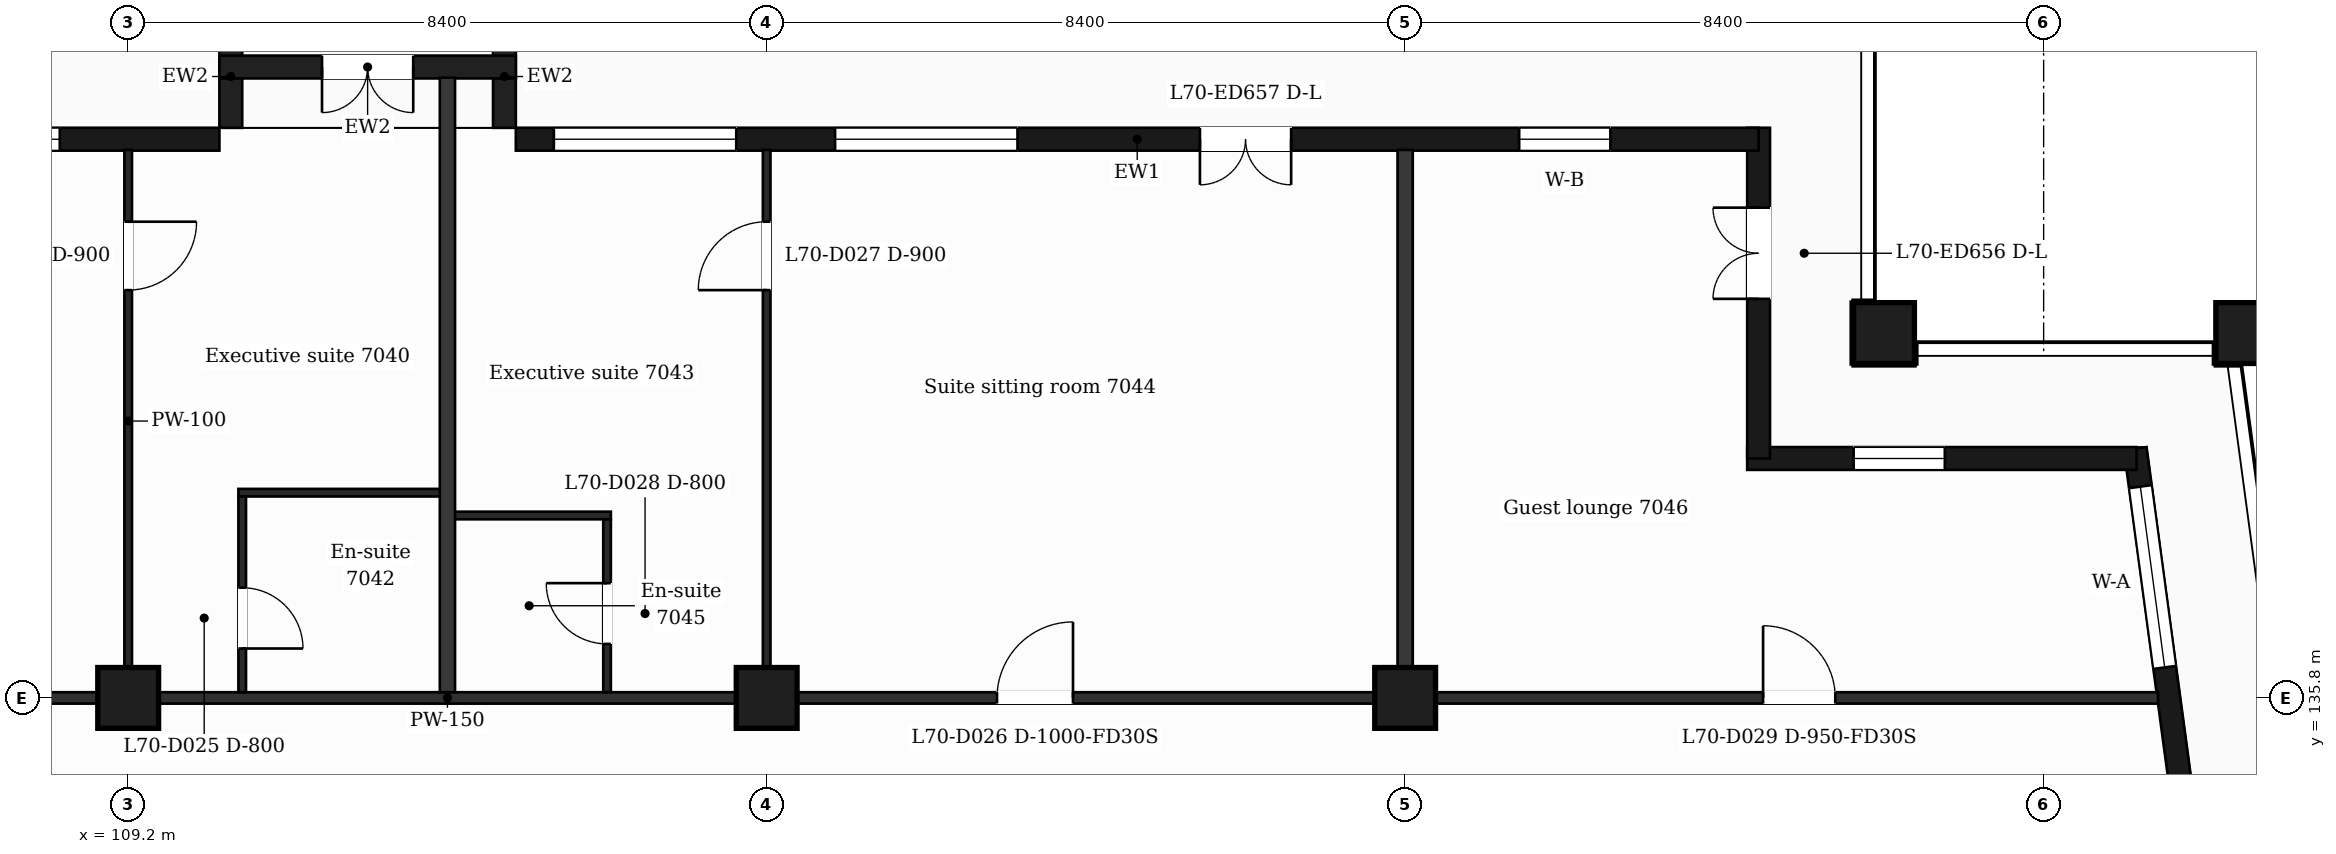
"""IFC4 building model, lengths in metres.
Left out: names, types, materials, properties, quantities, classifications, styles, units other than length and angle.
Written with IfcOpenShell. Run it as: python <this file> out.ifc"""

import sys

from ifc_helpers import new_model, si_unit, direction, frame, frame_2d, origin, origin_2d, place, context, subcontext, project, spatial, rectangle, extrude, element, fill, save


model = new_model("IFC4")
c1 = context("Model", 3, precision=1e-05, world=origin(), true_north=direction((0.0, 1.0)))
c2 = subcontext(c1, "Body", "Model", "MODEL_VIEW")
j1 = project(units=[si_unit("LENGTHUNIT", "METRE"), si_unit("PLANEANGLEUNIT", "RADIAN")], contexts=[c1])
p1 = place(None, origin())
s1 = spatial("IfcSite", under=j1, at=p1, CompositionType="ELEMENT")
p2 = place(p1, origin())
s2 = spatial("IfcBuilding", under=s1, at=p2, CompositionType="ELEMENT")
p3 = place(p2, frame((0.0, 0.0, 288.6)))
s3 = spatial("IfcBuildingStorey", under=s2, at=p3, CompositionType="ELEMENT", Elevation=288.6)
for number, where, z_axis, x_axis in (
    (1, (132.3, 140.6, 0.0), (0.0, 0.0, 1.0), (1.0, 0.0, 0.0)),
    (2, (137.065, 140.6, 0.0), (0.0, 0.0, 1.0), (1.0, 0.0, 0.0)),
    (3, (109.2, 135.8, 0.0), (0.0, 0.0, 1.0), (1.0, 0.0, 0.0)),
    (4, (117.6, 135.8, 0.0), (0.0, 0.0, 1.0), (1.0, 0.0, 0.0)),
    (5, (126.0, 135.8, 0.0), (0.0, 0.0, 1.0), (1.0, 0.0, 0.0)),
):
    element("IfcColumn", number, at=place(p3, frame(where, z_axis=z_axis, x_axis=x_axis)), inside=s3, PredefinedType="COLUMN", context=c2, shape_type="SweptSolid", body=[
        extrude(rectangle(XDim=0.8, YDim=0.8, at=origin_2d()), origin(), (0.0, 0.0, 1.0), 3.7),
    ])
p4 = place(p3, frame((136.504, 132.4, 0.0), z_axis=(0.0, 0.0, 1.0), x_axis=(-0.133399697462, 0.99106231929, 0.0)))
e6 = element("IfcWall", 6, at=p4, inside=s3, PredefinedType="SOLIDWALL", context=c2, shape_type="SweptSolid", body=[
    extrude(rectangle(XDim=6.74, YDim=0.3, at=frame_2d((3.37, 0.0))), origin(), (0.0, 0.0, 1.0), 3.38),
])
p5 = place(p4, frame((1.115, 0.0, 0.0)))
e7 = element("IfcOpeningElement", 7, at=p5, cuts=e6, PredefinedType="OPENING", context=c2, shape_type="SweptSolid", body=[
    extrude(rectangle(XDim=1.2, YDim=2.4, at=frame_2d((0.6, 1.2))), frame((0.0, 0.16, 0.0), z_axis=(0.0, -1.0, 0.0), x_axis=(1.0, 0.0, 0.0)), (0.0, 0.0, 1.0), 0.32),
])
p6 = place(p4, frame((3.835, 0.0, 0.9)))
e8 = element("IfcOpeningElement", 8, at=p6, cuts=e6, PredefinedType="OPENING", context=c2, shape_type="SweptSolid", body=[
    extrude(rectangle(XDim=2.4, YDim=2.1, at=frame_2d((1.2, 1.05))), frame((0.0, 0.16, 0.0), z_axis=(0.0, -1.0, 0.0), x_axis=(1.0, 0.0, 0.0)), (0.0, 0.0, 1.0), 0.32),
])
p7 = place(p3, frame((135.623, 138.95, 0.0), z_axis=(0.0, 0.0, 1.0), x_axis=(-1.0, 0.0, 0.0)))
e9 = element("IfcWall", 9, at=p7, inside=s3, PredefinedType="SOLIDWALL", context=c2, shape_type="SweptSolid", body=[
    extrude(rectangle(XDim=5.123, YDim=0.3, at=frame_2d((2.561, 0.0))), origin(), (0.0, 0.0, 1.0), 3.38),
])
p8 = place(p7, frame((2.523, 0.0, 0.9)))
e10 = element("IfcOpeningElement", 10, at=p8, cuts=e9, PredefinedType="OPENING", context=c2, shape_type="SweptSolid", body=[
    extrude(rectangle(XDim=1.2, YDim=2.1, at=frame_2d((0.6, 1.05))), frame((0.0, 0.16, 0.0), z_axis=(0.0, -1.0, 0.0), x_axis=(1.0, 0.0, 0.0)), (0.0, 0.0, 1.0), 0.32),
])
p9 = place(p3, frame((130.65, 138.95, 0.0), z_axis=(0.0, 0.0, 1.0), x_axis=(0.0, 1.0, 0.0)))
e11 = element("IfcWall", 11, at=p9, inside=s3, PredefinedType="SOLIDWALL", context=c2, shape_type="SweptSolid", body=[
    extrude(rectangle(XDim=4.35, YDim=0.3, at=frame_2d((2.175, 0.0))), origin(), (0.0, 0.0, 1.0), 3.38),
])
p10 = place(p9, frame((2.1, 0.0, 0.0)))
e12 = element("IfcOpeningElement", 12, at=p10, cuts=e11, PredefinedType="OPENING", context=c2, shape_type="SweptSolid", body=[
    extrude(rectangle(XDim=1.2, YDim=2.4, at=frame_2d((0.6, 1.2))), frame((0.0, 0.16, 0.0), z_axis=(0.0, -1.0, 0.0), x_axis=(1.0, 0.0, 0.0)), (0.0, 0.0, 1.0), 0.32),
])
p11 = place(p3, frame((130.65, 143.15, 0.0), z_axis=(0.0, 0.0, 1.0), x_axis=(-1.0, 0.0, 0.0)))
e13 = element("IfcWall", 13, at=p11, inside=s3, PredefinedType="SOLIDWALL", context=c2, shape_type="SweptSolid", body=[
    extrude(rectangle(XDim=16.35, YDim=0.3, at=frame_2d((8.175, 0.0))), origin(), (0.0, 0.0, 1.0), 3.38),
])
p12 = place(p11, frame((1.95, 0.0, 0.9)))
e14 = element("IfcOpeningElement", 14, at=p12, cuts=e13, PredefinedType="OPENING", context=c2, shape_type="SweptSolid", body=[
    extrude(rectangle(XDim=1.2, YDim=2.1, at=frame_2d((0.6, 1.05))), frame((0.0, 0.16, 0.0), z_axis=(0.0, -1.0, 0.0), x_axis=(1.0, 0.0, 0.0)), (0.0, 0.0, 1.0), 0.32),
])
p13 = place(p11, frame((6.15, 0.0, 0.0)))
e15 = element("IfcOpeningElement", 15, at=p13, cuts=e13, PredefinedType="OPENING", context=c2, shape_type="SweptSolid", body=[
    extrude(rectangle(XDim=1.2, YDim=2.4, at=frame_2d((0.6, 1.2))), frame((0.0, 0.16, 0.0), z_axis=(0.0, -1.0, 0.0), x_axis=(1.0, 0.0, 0.0)), (0.0, 0.0, 1.0), 0.32),
])
p14 = place(p11, frame((9.75, 0.0, 0.9)))
e16 = element("IfcOpeningElement", 16, at=p14, cuts=e13, PredefinedType="OPENING", context=c2, shape_type="SweptSolid", body=[
    extrude(rectangle(XDim=2.4, YDim=2.1, at=frame_2d((1.2, 1.05))), frame((0.0, 0.16, 0.0), z_axis=(0.0, -1.0, 0.0), x_axis=(1.0, 0.0, 0.0)), (0.0, 0.0, 1.0), 0.32),
])
p15 = place(p11, frame((13.45, 0.0, 0.9)))
e17 = element("IfcOpeningElement", 17, at=p15, cuts=e13, PredefinedType="OPENING", context=c2, shape_type="SweptSolid", body=[
    extrude(rectangle(XDim=2.4, YDim=2.1, at=frame_2d((1.2, 1.05))), frame((0.0, 0.16, 0.0), z_axis=(0.0, -1.0, 0.0), x_axis=(1.0, 0.0, 0.0)), (0.0, 0.0, 1.0), 0.32),
])
p16 = place(p3, frame((110.4, 143.15, 0.0), z_axis=(0.0, 0.0, 1.0), x_axis=(-1.0, 0.0, 0.0)))
e18 = element("IfcWall", 18, at=p16, inside=s3, PredefinedType="SOLIDWALL", context=c2, shape_type="SweptSolid", body=[
    extrude(rectangle(XDim=14.4, YDim=0.3, at=frame_2d((7.2, 0.0))), origin(), (0.0, 0.0, 1.0), 3.38),
])
p17 = place(p16, frame((2.1, 0.0, 0.9)))
e19 = element("IfcOpeningElement", 19, at=p17, cuts=e18, PredefinedType="OPENING", context=c2, shape_type="SweptSolid", body=[
    extrude(rectangle(XDim=2.4, YDim=2.1, at=frame_2d((1.2, 1.05))), frame((0.0, 0.16, 0.0), z_axis=(0.0, -1.0, 0.0), x_axis=(1.0, 0.0, 0.0)), (0.0, 0.0, 1.0), 0.32),
])
p18 = place(p16, frame((6.9, 0.0, 0.0)))
e20 = element("IfcOpeningElement", 20, at=p18, cuts=e18, PredefinedType="OPENING", context=c2, shape_type="SweptSolid", body=[
    extrude(rectangle(XDim=1.2, YDim=2.4, at=frame_2d((0.6, 1.2))), frame((0.0, 0.16, 0.0), z_axis=(0.0, -1.0, 0.0), x_axis=(1.0, 0.0, 0.0)), (0.0, 0.0, 1.0), 0.32),
])
p19 = place(p16, frame((11.1, 0.0, 0.9)))
e21 = element("IfcOpeningElement", 21, at=p19, cuts=e18, PredefinedType="OPENING", context=c2, shape_type="SweptSolid", body=[
    extrude(rectangle(XDim=1.2, YDim=2.1, at=frame_2d((0.6, 1.05))), frame((0.0, 0.16, 0.0), z_axis=(0.0, -1.0, 0.0), x_axis=(1.0, 0.0, 0.0)), (0.0, 0.0, 1.0), 0.32),
])
for number, where, z_axis, x_axis in (
    (22, (114.15, 143.3, 0.0), (0.0, 0.0, 1.0), (0.0, 1.0, 0.0)),
    (23, (110.55, 143.3, 0.0), (0.0, 0.0, 1.0), (0.0, 1.0, 0.0)),
):
    element("IfcWall", number, at=place(p3, frame(where, z_axis=z_axis, x_axis=x_axis)), inside=s3, PredefinedType="SOLIDWALL", context=c2, shape_type="SweptSolid", body=[
        extrude(rectangle(XDim=1.35, YDim=0.3, at=frame_2d((0.675, 0.0))), origin(), (0.0, 0.0, 1.0), 3.38),
    ])
p20 = place(p3, frame((114.3, 144.1, 0.0), z_axis=(0.0, 0.0, 1.0), x_axis=(-1.0, 0.0, 0.0)))
e24 = element("IfcWall", 24, at=p20, inside=s3, PredefinedType="SOLIDWALL", context=c2, shape_type="SweptSolid", body=[
    extrude(rectangle(XDim=3.9, YDim=0.3, at=frame_2d((1.95, 0.0))), origin(), (0.0, 0.0, 1.0), 3.38),
])
p21 = place(p20, frame((1.35, 0.0, 0.0)))
e25 = element("IfcOpeningElement", 25, at=p21, cuts=e24, PredefinedType="OPENING", context=c2, shape_type="SweptSolid", body=[
    extrude(rectangle(XDim=1.2, YDim=2.4, at=frame_2d((0.6, 1.2))), frame((0.0, 0.16, 0.0), z_axis=(0.0, -1.0, 0.0), x_axis=(1.0, 0.0, 0.0)), (0.0, 0.0, 1.0), 0.32),
])
p22 = place(p3, frame((90.895, 135.8, 0.0), z_axis=(0.0, 0.0, 1.0), x_axis=(1.0, 0.0, 0.0)))
e26 = element("IfcWall", 26, at=p22, inside=s3, PredefinedType="PARTITIONING", context=c2, shape_type="SweptSolid", body=[
    extrude(rectangle(XDim=45.011, YDim=0.15, at=frame_2d((22.505, 0.0))), origin(), (0.0, 0.0, 1.0), 3.38),
])
p23 = place(p22, frame((8.005, 0.0, 0.0)))
e27 = element("IfcOpeningElement", 27, at=p23, cuts=e26, PredefinedType="OPENING", context=c2, shape_type="SweptSolid", body=[
    extrude(rectangle(XDim=1.0, YDim=2.1, at=frame_2d((0.5, 1.05))), frame((0.0, 0.085, 0.0), z_axis=(0.0, -1.0, 0.0), x_axis=(1.0, 0.0, 0.0)), (0.0, 0.0, 1.0), 0.17),
])
p24 = place(p22, frame((13.605, 0.0, 0.0)))
e28 = element("IfcOpeningElement", 28, at=p24, cuts=e26, PredefinedType="OPENING", context=c2, shape_type="SweptSolid", body=[
    extrude(rectangle(XDim=1.0, YDim=2.1, at=frame_2d((0.5, 1.05))), frame((0.0, 0.085, 0.0), z_axis=(0.0, -1.0, 0.0), x_axis=(1.0, 0.0, 0.0)), (0.0, 0.0, 1.0), 0.17),
])
p25 = place(p22, frame((29.735, 0.0, 0.0)))
e29 = element("IfcOpeningElement", 29, at=p25, cuts=e26, PredefinedType="OPENING", context=c2, shape_type="SweptSolid", body=[
    extrude(rectangle(XDim=1.0, YDim=2.1, at=frame_2d((0.5, 1.05))), frame((0.0, 0.085, 0.0), z_axis=(0.0, -1.0, 0.0), x_axis=(1.0, 0.0, 0.0)), (0.0, 0.0, 1.0), 0.17),
])
p26 = place(p22, frame((39.814, 0.0, 0.0)))
e30 = element("IfcOpeningElement", 30, at=p26, cuts=e26, PredefinedType="OPENING", context=c2, shape_type="SweptSolid", body=[
    extrude(rectangle(XDim=0.95, YDim=2.1, at=frame_2d((0.475, 1.05))), frame((0.0, 0.085, 0.0), z_axis=(0.0, -1.0, 0.0), x_axis=(1.0, 0.0, 0.0)), (0.0, 0.0, 1.0), 0.17),
])
p27 = place(p3, frame((113.4, 138.2, 0.0), z_axis=(0.0, 0.0, 1.0), x_axis=(1.0, 0.0, 0.0)))
e31 = element("IfcWall", 31, at=p27, inside=s3, PredefinedType="PARTITIONING", context=c2, shape_type="SweptSolid", body=[
    extrude(rectangle(XDim=2.15, YDim=0.1, at=frame_2d((1.075, 0.0))), origin(), (0.0, 0.0, 1.0), 3.38),
])
p28 = place(p3, frame((110.65, 138.5, 0.0), z_axis=(0.0, 0.0, 1.0), x_axis=(1.0, 0.0, 0.0)))
e32 = element("IfcWall", 32, at=p28, inside=s3, PredefinedType="PARTITIONING", context=c2, shape_type="SweptSolid", body=[
    extrude(rectangle(XDim=2.75, YDim=0.1, at=frame_2d((1.375, 0.0))), origin(), (0.0, 0.0, 1.0), 3.38),
])
p29 = place(p3, frame((109.2, 135.875, 0.0), z_axis=(0.0, 0.0, 1.0), x_axis=(0.0, 1.0, 0.0)))
e33 = element("IfcWall", 33, at=p29, inside=s3, PredefinedType="PARTITIONING", context=c2, shape_type="SweptSolid", body=[
    extrude(rectangle(XDim=7.135, YDim=0.1, at=frame_2d((3.567, 0.0))), origin(), (0.0, 0.0, 1.0), 3.38),
])
p30 = place(p29, frame((5.29, 0.0, 0.0)))
e34 = element("IfcOpeningElement", 34, at=p30, cuts=e33, PredefinedType="OPENING", context=c2, shape_type="SweptSolid", body=[
    extrude(rectangle(XDim=0.9, YDim=2.1, at=frame_2d((0.45, 1.05))), frame((0.0, 0.06, 0.0), z_axis=(0.0, -1.0, 0.0), x_axis=(1.0, 0.0, 0.0)), (0.0, 0.0, 1.0), 0.12),
])
p31 = place(p3, frame((110.7, 135.875, 0.0), z_axis=(0.0, 0.0, 1.0), x_axis=(0.0, 1.0, 0.0)))
e35 = element("IfcWall", 35, at=p31, inside=s3, PredefinedType="PARTITIONING", context=c2, shape_type="SweptSolid", body=[
    extrude(rectangle(XDim=2.575, YDim=0.1, at=frame_2d((1.288, 0.0))), origin(), (0.0, 0.0, 1.0), 3.38),
])
p32 = place(p31, frame((0.575, 0.0, 0.0)))
e36 = element("IfcOpeningElement", 36, at=p32, cuts=e35, PredefinedType="OPENING", context=c2, shape_type="SweptSolid", body=[
    extrude(rectangle(XDim=0.8, YDim=2.1, at=frame_2d((0.4, 1.05))), frame((0.0, 0.06, 0.0), z_axis=(0.0, -1.0, 0.0), x_axis=(1.0, 0.0, 0.0)), (0.0, 0.0, 1.0), 0.12),
])
p33 = place(p3, frame((113.4, 135.875, 0.0), z_axis=(0.0, 0.0, 1.0), x_axis=(0.0, 1.0, 0.0)))
e37 = element("IfcWall", 37, at=p33, inside=s3, PredefinedType="PARTITIONING", context=c2, shape_type="SweptSolid", body=[
    extrude(rectangle(XDim=8.085, YDim=0.2, at=frame_2d((4.042, 0.0))), origin(), (0.0, 0.0, 1.0), 3.38),
])
p34 = place(p3, frame((115.5, 135.875, 0.0), z_axis=(0.0, 0.0, 1.0), x_axis=(0.0, 1.0, 0.0)))
e38 = element("IfcWall", 38, at=p34, inside=s3, PredefinedType="PARTITIONING", context=c2, shape_type="SweptSolid", body=[
    extrude(rectangle(XDim=2.275, YDim=0.1, at=frame_2d((1.137, 0.0))), origin(), (0.0, 0.0, 1.0), 3.38),
])
p35 = place(p34, frame((0.635, 0.0, 0.0)))
e39 = element("IfcOpeningElement", 39, at=p35, cuts=e38, PredefinedType="OPENING", context=c2, shape_type="SweptSolid", body=[
    extrude(rectangle(XDim=0.8, YDim=2.1, at=frame_2d((0.4, 1.05))), frame((0.0, 0.06, 0.0), z_axis=(0.0, -1.0, 0.0), x_axis=(1.0, 0.0, 0.0)), (0.0, 0.0, 1.0), 0.12),
])
p36 = place(p3, frame((117.6, 135.875, 0.0), z_axis=(0.0, 0.0, 1.0), x_axis=(0.0, 1.0, 0.0)))
e40 = element("IfcWall", 40, at=p36, inside=s3, PredefinedType="PARTITIONING", context=c2, shape_type="SweptSolid", body=[
    extrude(rectangle(XDim=7.135, YDim=0.1, at=frame_2d((3.567, 0.0))), origin(), (0.0, 0.0, 1.0), 3.38),
])
p37 = place(p36, frame((5.29, 0.0, 0.0)))
e41 = element("IfcOpeningElement", 41, at=p37, cuts=e40, PredefinedType="OPENING", context=c2, shape_type="SweptSolid", body=[
    extrude(rectangle(XDim=0.9, YDim=2.1, at=frame_2d((0.45, 1.05))), frame((0.0, 0.06, 0.0), z_axis=(0.0, -1.0, 0.0), x_axis=(1.0, 0.0, 0.0)), (0.0, 0.0, 1.0), 0.12),
])
p38 = place(p3, frame((126.0, 135.875, 0.0), z_axis=(0.0, 0.0, 1.0), x_axis=(0.0, 1.0, 0.0)))
e42 = element("IfcWall", 42, at=p38, inside=s3, PredefinedType="PARTITIONING", context=c2, shape_type="SweptSolid", body=[
    extrude(rectangle(XDim=7.135, YDim=0.2, at=frame_2d((3.567, 0.0))), origin(), (0.0, 0.0, 1.0), 3.38),
])
p39 = place(p6, origin())
e43 = element("IfcWindow", 43, at=p39, inside=s3, PartitioningType="SINGLE_PANEL", PredefinedType="WINDOW", context=c2, shape_type="SweptSolid", body=[
    extrude(rectangle(XDim=2.4, YDim=2.1, at=frame_2d((1.2, 1.05))), frame((0.0, 0.03, 0.0), z_axis=(0.0, -1.0, 0.0), x_axis=(1.0, 0.0, 0.0)), (0.0, 0.0, 1.0), 0.06),
])
fill(e8, e43)
p40 = place(p8, origin())
e44 = element("IfcWindow", 44, at=p40, inside=s3, PartitioningType="SINGLE_PANEL", PredefinedType="WINDOW", context=c2, shape_type="SweptSolid", body=[
    extrude(rectangle(XDim=1.2, YDim=2.1, at=frame_2d((0.6, 1.05))), frame((0.0, 0.03, 0.0), z_axis=(0.0, -1.0, 0.0), x_axis=(1.0, 0.0, 0.0)), (0.0, 0.0, 1.0), 0.06),
])
fill(e10, e44)
p41 = place(p10, origin())
e45 = element("IfcDoor", 45, at=p41, inside=s3, OperationType="DOUBLE_DOOR_SINGLE_SWING", PredefinedType="DOOR", context=c2, shape_type="SweptSolid", body=[
    extrude(rectangle(XDim=1.2, YDim=2.4, at=frame_2d((0.6, 1.2))), frame((0.0, 0.025, 0.0), z_axis=(0.0, -1.0, 0.0), x_axis=(1.0, 0.0, 0.0)), (0.0, 0.0, 1.0), 0.05),
])
fill(e12, e45)
p42 = place(p12, origin())
e46 = element("IfcWindow", 46, at=p42, inside=s3, PartitioningType="SINGLE_PANEL", PredefinedType="WINDOW", context=c2, shape_type="SweptSolid", body=[
    extrude(rectangle(XDim=1.2, YDim=2.1, at=frame_2d((0.6, 1.05))), frame((0.0, 0.03, 0.0), z_axis=(0.0, -1.0, 0.0), x_axis=(1.0, 0.0, 0.0)), (0.0, 0.0, 1.0), 0.06),
])
fill(e14, e46)
p43 = place(p13, origin())
e47 = element("IfcDoor", 47, at=p43, inside=s3, OperationType="DOUBLE_DOOR_SINGLE_SWING", PredefinedType="DOOR", context=c2, shape_type="SweptSolid", body=[
    extrude(rectangle(XDim=1.2, YDim=2.4, at=frame_2d((0.6, 1.2))), frame((0.0, 0.025, 0.0), z_axis=(0.0, -1.0, 0.0), x_axis=(1.0, 0.0, 0.0)), (0.0, 0.0, 1.0), 0.05),
])
fill(e15, e47)
p44 = place(p14, origin())
e48 = element("IfcWindow", 48, at=p44, inside=s3, PartitioningType="SINGLE_PANEL", PredefinedType="WINDOW", context=c2, shape_type="SweptSolid", body=[
    extrude(rectangle(XDim=2.4, YDim=2.1, at=frame_2d((1.2, 1.05))), frame((0.0, 0.03, 0.0), z_axis=(0.0, -1.0, 0.0), x_axis=(1.0, 0.0, 0.0)), (0.0, 0.0, 1.0), 0.06),
])
fill(e16, e48)
p45 = place(p15, origin())
e49 = element("IfcWindow", 49, at=p45, inside=s3, PartitioningType="SINGLE_PANEL", PredefinedType="WINDOW", context=c2, shape_type="SweptSolid", body=[
    extrude(rectangle(XDim=2.4, YDim=2.1, at=frame_2d((1.2, 1.05))), frame((0.0, 0.03, 0.0), z_axis=(0.0, -1.0, 0.0), x_axis=(1.0, 0.0, 0.0)), (0.0, 0.0, 1.0), 0.06),
])
fill(e17, e49)
p46 = place(p17, origin())
e50 = element("IfcWindow", 50, at=p46, inside=s3, PartitioningType="SINGLE_PANEL", PredefinedType="WINDOW", context=c2, shape_type="SweptSolid", body=[
    extrude(rectangle(XDim=2.4, YDim=2.1, at=frame_2d((1.2, 1.05))), frame((0.0, 0.03, 0.0), z_axis=(0.0, -1.0, 0.0), x_axis=(1.0, 0.0, 0.0)), (0.0, 0.0, 1.0), 0.06),
])
fill(e19, e50)
p47 = place(p21, origin())
e51 = element("IfcDoor", 51, at=p47, inside=s3, OperationType="DOUBLE_DOOR_SINGLE_SWING", PredefinedType="DOOR", context=c2, shape_type="SweptSolid", body=[
    extrude(rectangle(XDim=1.2, YDim=2.4, at=frame_2d((0.6, 1.2))), frame((0.0, 0.025, 0.0), z_axis=(0.0, -1.0, 0.0), x_axis=(1.0, 0.0, 0.0)), (0.0, 0.0, 1.0), 0.05),
])
fill(e25, e51)
p48 = place(p30, origin())
e52 = element("IfcDoor", 52, at=p48, inside=s3, OperationType="SINGLE_SWING_RIGHT", PredefinedType="DOOR", context=c2, shape_type="SweptSolid", body=[
    extrude(rectangle(XDim=0.9, YDim=2.1, at=frame_2d((0.45, 1.05))), frame((0.0, 0.025, 0.0), z_axis=(0.0, -1.0, 0.0), x_axis=(1.0, 0.0, 0.0)), (0.0, 0.0, 1.0), 0.05),
])
fill(e34, e52)
p49 = place(p32, origin())
e53 = element("IfcDoor", 53, at=p49, inside=s3, OperationType="SINGLE_SWING_LEFT", PredefinedType="DOOR", context=c2, shape_type="SweptSolid", body=[
    extrude(rectangle(XDim=0.8, YDim=2.1, at=frame_2d((0.4, 1.05))), frame((0.0, 0.025, 0.0), z_axis=(0.0, -1.0, 0.0), x_axis=(1.0, 0.0, 0.0)), (0.0, 0.0, 1.0), 0.05),
])
fill(e36, e53)
p50 = place(p25, origin())
e54 = element("IfcDoor", 54, at=p50, inside=s3, OperationType="SINGLE_SWING_RIGHT", PredefinedType="DOOR", context=c2, shape_type="SweptSolid", body=[
    extrude(rectangle(XDim=1.0, YDim=2.1, at=frame_2d((0.5, 1.05))), frame((0.0, 0.025, 0.0), z_axis=(0.0, -1.0, 0.0), x_axis=(1.0, 0.0, 0.0)), (0.0, 0.0, 1.0), 0.05),
])
fill(e29, e54)
p51 = place(p37, origin())
e55 = element("IfcDoor", 55, at=p51, inside=s3, OperationType="SINGLE_SWING_LEFT", PredefinedType="DOOR", context=c2, shape_type="SweptSolid", body=[
    extrude(rectangle(XDim=0.9, YDim=2.1, at=frame_2d((0.45, 1.05))), frame((0.0, 0.025, 0.0), z_axis=(0.0, -1.0, 0.0), x_axis=(1.0, 0.0, 0.0)), (0.0, 0.0, 1.0), 0.05),
])
fill(e41, e55)
p52 = place(p35, origin())
e56 = element("IfcDoor", 56, at=p52, inside=s3, OperationType="SINGLE_SWING_RIGHT", PredefinedType="DOOR", context=c2, shape_type="SweptSolid", body=[
    extrude(rectangle(XDim=0.8, YDim=2.1, at=frame_2d((0.4, 1.05))), frame((0.0, 0.025, 0.0), z_axis=(0.0, -1.0, 0.0), x_axis=(1.0, 0.0, 0.0)), (0.0, 0.0, 1.0), 0.05),
])
fill(e39, e56)
p53 = place(p26, origin())
e57 = element("IfcDoor", 57, at=p53, inside=s3, OperationType="SINGLE_SWING_LEFT", PredefinedType="DOOR", context=c2, shape_type="SweptSolid", body=[
    extrude(rectangle(XDim=0.95, YDim=2.1, at=frame_2d((0.475, 1.05))), frame((0.0, 0.025, 0.0), z_axis=(0.0, -1.0, 0.0), x_axis=(1.0, 0.0, 0.0)), (0.0, 0.0, 1.0), 0.05),
])
fill(e30, e57)
save(model, sys.argv[1])
